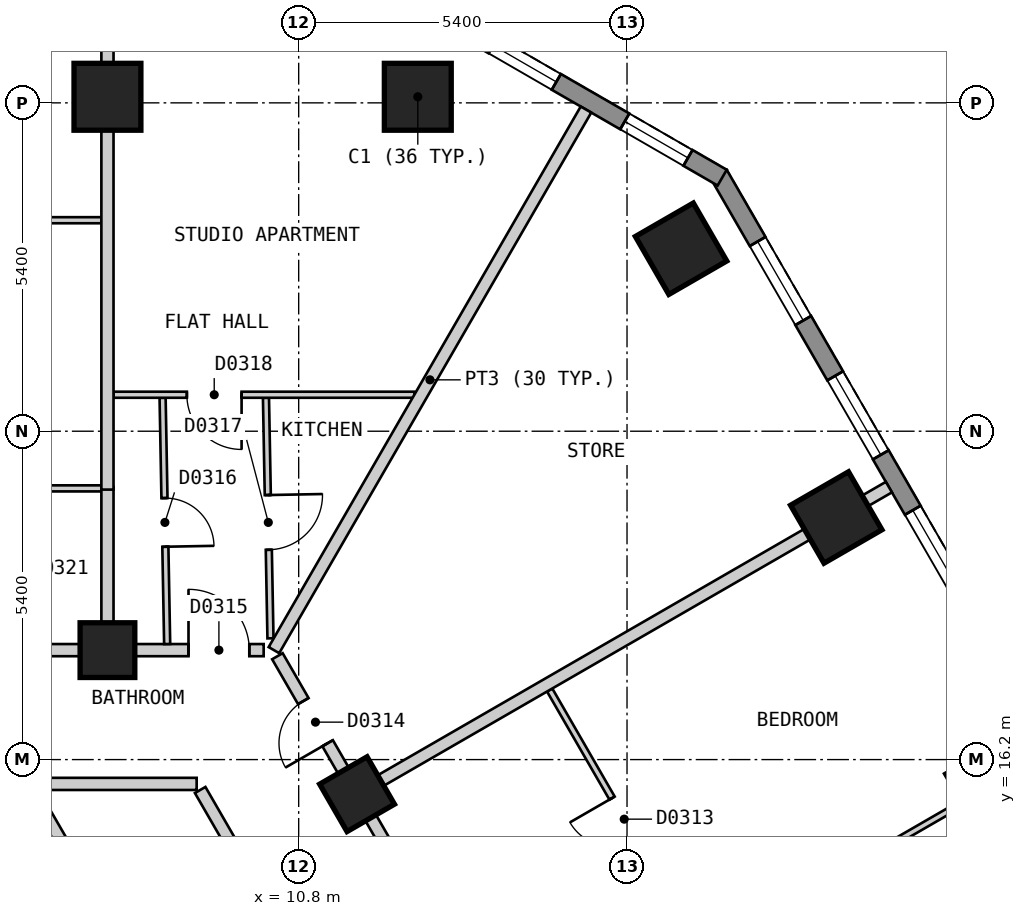
"""IFC4 building model, lengths in metres.
Left out: names, types, materials, properties, quantities, classifications, styles, units other than length and angle.
Written with IfcOpenShell. Run it as: python <this file> out.ifc"""

import sys

from ifc_helpers import new_model, si_unit, direction, frame, frame_2d, origin, origin_2d, place, context, subcontext, project, spatial, polyline, rectangle, outline, extrude, element, fill, save


model = new_model("IFC4")
c1 = context("Model", 3, precision=1e-05, world=origin(), true_north=direction((0.0, 1.0)))
c2 = subcontext(c1, "Body", "Model", "MODEL_VIEW")
j1 = project(units=[si_unit("LENGTHUNIT", "METRE"), si_unit("PLANEANGLEUNIT", "RADIAN")], contexts=[c1])
p1 = place(None, origin())
s1 = spatial("IfcSite", under=j1, at=p1, CompositionType="ELEMENT")
p2 = place(p1, origin())
s2 = spatial("IfcBuilding", under=s1, at=p2, CompositionType="ELEMENT")
p3 = place(p2, frame((0.0, 0.0, 59.4)))
s3 = spatial("IfcBuildingStorey", under=s2, at=p3, CompositionType="ELEMENT", Elevation=59.4)
for number, where, z_axis, x_axis in (
    (1, (12.759, 27.1, 0.0), (0.0, 0.0, 1.0), (-1.0, 0.0, 0.0)),
    (2, (7.655, 27.1, 0.0), (0.0, 0.0, 1.0), (-1.0, 0.0, 0.0)),
    (3, (22.193, 15.761, 0.0), (0.0, 0.0, 1.0), (-0.5, 0.866, 0.0)),
    (4, (19.641, 20.181, 0.0), (0.0, 0.0, 1.0), (-0.5, 0.866, 0.0)),
    (5, (17.089, 24.601, 0.0), (0.0, 0.0, 1.0), (-0.5, 0.866, 0.0)),
):
    element("IfcColumn", number, at=place(p3, frame(where, z_axis=z_axis, x_axis=x_axis)), inside=s3, PredefinedType="COLUMN", context=c2, shape_type="SweptSolid", body=[
        extrude(rectangle(XDim=1.1, YDim=1.1, at=origin_2d()), origin(), (0.0, 0.0, 1.0), 3.0),
    ])
for number, where, z_axis, x_axis in (
    (6, (11.76, 15.631, 0.0), (0.0, 0.0, 1.0), (-0.5, 0.866, 0.0)),
    (7, (7.655, 18.0, 0.0), (0.0, 0.0, 1.0), (-1.0, 0.0, 0.0)),
):
    element("IfcColumn", number, at=place(p3, frame(where, z_axis=z_axis, x_axis=x_axis)), inside=s3, PredefinedType="COLUMN", context=c2, shape_type="SweptSolid", body=[
        extrude(rectangle(XDim=0.9, YDim=0.9, at=origin_2d()), origin(), (0.0, 0.0, 1.0), 3.0),
    ])
p4 = place(p3, frame((31.22, 2.425, 0.0), z_axis=(0.0, 0.0, 1.0), x_axis=(-0.500001938803, 0.866024284413, 0.0)))
e8 = element("IfcWall", 8, at=p4, inside=s3, PredefinedType="SOLIDWALL", context=c2, shape_type="SweptSolid", body=[
    extrude(outline(polyline([(0.0, -0.15), (27.02, -0.15), (26.94, 0.15), (0.08, 0.15), (0.0, -0.15)])), origin(), (0.0, 0.0, 1.0), 2.6),
])
p5 = place(p4, frame((1.277, 0.0, 0.15)))
e9 = element("IfcOpeningElement", 9, at=p5, cuts=e8, PredefinedType="OPENING", context=c2, shape_type="SweptSolid", body=[
    extrude(rectangle(XDim=1.5, YDim=2.1, at=frame_2d((0.75, 1.05))), frame((0.0, 0.16, 0.0), z_axis=(0.0, -1.0, 0.0), x_axis=(1.0, 0.0, 0.0)), (0.0, 0.0, 1.0), 0.32),
])
p6 = place(p4, frame((3.829, 0.0, 0.15)))
e10 = element("IfcOpeningElement", 10, at=p6, cuts=e8, PredefinedType="OPENING", context=c2, shape_type="SweptSolid", body=[
    extrude(rectangle(XDim=1.5, YDim=2.1, at=frame_2d((0.75, 1.05))), frame((0.0, 0.16, 0.0), z_axis=(0.0, -1.0, 0.0), x_axis=(1.0, 0.0, 0.0)), (0.0, 0.0, 1.0), 0.32),
])
p7 = place(p4, frame((6.382, 0.0, 0.15)))
e11 = element("IfcOpeningElement", 11, at=p7, cuts=e8, PredefinedType="OPENING", context=c2, shape_type="SweptSolid", body=[
    extrude(rectangle(XDim=1.5, YDim=2.1, at=frame_2d((0.75, 1.05))), frame((0.0, 0.16, 0.0), z_axis=(0.0, -1.0, 0.0), x_axis=(1.0, 0.0, 0.0)), (0.0, 0.0, 1.0), 0.32),
])
p8 = place(p4, frame((8.933, 0.0, 0.15)))
e12 = element("IfcOpeningElement", 12, at=p8, cuts=e8, PredefinedType="OPENING", context=c2, shape_type="SweptSolid", body=[
    extrude(rectangle(XDim=1.5, YDim=2.1, at=frame_2d((0.75, 1.05))), frame((0.0, 0.16, 0.0), z_axis=(0.0, -1.0, 0.0), x_axis=(1.0, 0.0, 0.0)), (0.0, 0.0, 1.0), 0.32),
])
p9 = place(p4, frame((11.485, 0.0, 0.15)))
e13 = element("IfcOpeningElement", 13, at=p9, cuts=e8, PredefinedType="OPENING", context=c2, shape_type="SweptSolid", body=[
    extrude(rectangle(XDim=1.5, YDim=2.1, at=frame_2d((0.75, 1.05))), frame((0.0, 0.16, 0.0), z_axis=(0.0, -1.0, 0.0), x_axis=(1.0, 0.0, 0.0)), (0.0, 0.0, 1.0), 0.32),
])
p10 = place(p4, frame((14.037, 0.0, 0.15)))
e14 = element("IfcOpeningElement", 14, at=p10, cuts=e8, PredefinedType="OPENING", context=c2, shape_type="SweptSolid", body=[
    extrude(rectangle(XDim=1.5, YDim=2.1, at=frame_2d((0.75, 1.05))), frame((0.0, 0.16, 0.0), z_axis=(0.0, -1.0, 0.0), x_axis=(1.0, 0.0, 0.0)), (0.0, 0.0, 1.0), 0.32),
])
p11 = place(p4, frame((16.589, 0.0, 0.15)))
e15 = element("IfcOpeningElement", 15, at=p11, cuts=e8, PredefinedType="OPENING", context=c2, shape_type="SweptSolid", body=[
    extrude(rectangle(XDim=1.5, YDim=2.1, at=frame_2d((0.75, 1.05))), frame((0.0, 0.16, 0.0), z_axis=(0.0, -1.0, 0.0), x_axis=(1.0, 0.0, 0.0)), (0.0, 0.0, 1.0), 0.32),
])
p12 = place(p4, frame((19.141, 0.0, 0.15)))
e16 = element("IfcOpeningElement", 16, at=p12, cuts=e8, PredefinedType="OPENING", context=c2, shape_type="SweptSolid", body=[
    extrude(rectangle(XDim=1.5, YDim=2.1, at=frame_2d((0.75, 1.05))), frame((0.0, 0.16, 0.0), z_axis=(0.0, -1.0, 0.0), x_axis=(1.0, 0.0, 0.0)), (0.0, 0.0, 1.0), 0.32),
])
p13 = place(p4, frame((21.693, 0.0, 0.15)))
e17 = element("IfcOpeningElement", 17, at=p13, cuts=e8, PredefinedType="OPENING", context=c2, shape_type="SweptSolid", body=[
    extrude(rectangle(XDim=1.5, YDim=2.1, at=frame_2d((0.75, 1.05))), frame((0.0, 0.16, 0.0), z_axis=(0.0, -1.0, 0.0), x_axis=(1.0, 0.0, 0.0)), (0.0, 0.0, 1.0), 0.32),
])
p14 = place(p4, frame((24.244, 0.0, 0.15)))
e18 = element("IfcOpeningElement", 18, at=p14, cuts=e8, PredefinedType="OPENING", context=c2, shape_type="SweptSolid", body=[
    extrude(rectangle(XDim=1.5, YDim=2.1, at=frame_2d((0.75, 1.05))), frame((0.0, 0.16, 0.0), z_axis=(0.0, -1.0, 0.0), x_axis=(1.0, 0.0, 0.0)), (0.0, 0.0, 1.0), 0.32),
])
p15 = place(p3, frame((17.765, 25.77, 0.0), z_axis=(0.0, 0.0, 1.0), x_axis=(-0.866010750942, 0.50002537861, 0.0)))
e19 = element("IfcWall", 19, at=p15, inside=s3, PredefinedType="SOLIDWALL", context=c2, shape_type="SweptSolid", body=[
    extrude(outline(polyline([(0.0, -0.15), (5.0, -0.15), (4.919, 0.15), (0.08, 0.15), (0.0, -0.15)])), origin(), (0.0, 0.0, 1.0), 2.6),
])
p16 = place(p15, frame((0.65, 0.0, 0.15)))
e20 = element("IfcOpeningElement", 20, at=p16, cuts=e19, PredefinedType="OPENING", context=c2, shape_type="SweptSolid", body=[
    extrude(rectangle(XDim=1.2, YDim=2.1, at=frame_2d((0.6, 1.05))), frame((0.0, 0.16, 0.0), z_axis=(0.0, -1.0, 0.0), x_axis=(1.0, 0.0, 0.0)), (0.0, 0.0, 1.0), 0.32),
])
p17 = place(p15, frame((3.15, 0.0, 0.15)))
e21 = element("IfcOpeningElement", 21, at=p17, cuts=e19, PredefinedType="OPENING", context=c2, shape_type="SweptSolid", body=[
    extrude(rectangle(XDim=1.2, YDim=2.1, at=frame_2d((0.6, 1.05))), frame((0.0, 0.16, 0.0), z_axis=(0.0, -1.0, 0.0), x_axis=(1.0, 0.0, 0.0)), (0.0, 0.0, 1.0), 0.32),
])
p18 = place(p3, frame((6.409, 15.7, 0.0), z_axis=(0.0, 0.0, 1.0), x_axis=(0.499930377127, -0.866065596838, 0.0)))
e22 = element("IfcWall", 22, at=p18, inside=s3, PredefinedType="PARTITIONING", context=c2, shape_type="SweptSolid", body=[
    extrude(rectangle(XDim=8.775, YDim=0.2, at=frame_2d((4.388, 0.0))), origin(), (0.0, 0.0, 1.0), 2.6),
])
p19 = place(p3, frame((9.18, 15.7, 0.0), z_axis=(0.0, 0.0, 1.0), x_axis=(0.500003652032, -0.866023295272, 0.0)))
e23 = element("IfcWall", 23, at=p19, inside=s3, PredefinedType="PARTITIONING", context=c2, shape_type="SweptSolid", body=[
    extrude(rectangle(XDim=18.012, YDim=0.2, at=frame_2d((9.006, 0.0))), origin(), (0.0, 0.0, 1.0), 2.6),
])
p20 = place(p19, frame((8.556, 0.0, 0.0)))
e24 = element("IfcOpeningElement", 24, at=p20, cuts=e23, PredefinedType="OPENING", context=c2, shape_type="SweptSolid", body=[
    extrude(rectangle(XDim=0.9, YDim=2.1, at=frame_2d((0.45, 1.05))), frame((0.0, 0.11, 0.0), z_axis=(0.0, -1.0, 0.0), x_axis=(1.0, 0.0, 0.0)), (0.0, 0.0, 1.0), 0.22),
])
p21 = place(p3, frame((10.45, 17.9, 0.0), z_axis=(0.0, 0.0, 1.0), x_axis=(0.500034352617, -0.866005569383, 0.0)))
e25 = element("IfcWall", 25, at=p21, inside=s3, PredefinedType="PARTITIONING", context=c2, shape_type="SweptSolid", body=[
    extrude(rectangle(XDim=20.553, YDim=0.2, at=frame_2d((10.276, 0.0))), origin(), (0.0, 0.0, 1.0), 2.6),
])
p22 = place(p21, frame((14.903, 0.0, 0.0)))
e26 = element("IfcOpeningElement", 26, at=p22, cuts=e25, PredefinedType="OPENING", context=c2, shape_type="SweptSolid", body=[
    extrude(rectangle(XDim=1.0, YDim=2.1, at=frame_2d((0.5, 1.05))), frame((0.0, 0.11, 0.0), z_axis=(0.0, -1.0, 0.0), x_axis=(1.0, 0.0, 0.0)), (0.0, 0.0, 1.0), 0.22),
])
p23 = place(p21, frame((9.775, 0.0, 0.0)))
e27 = element("IfcOpeningElement", 27, at=p23, cuts=e25, PredefinedType="OPENING", context=c2, shape_type="SweptSolid", body=[
    extrude(rectangle(XDim=1.0, YDim=2.1, at=frame_2d((0.5, 1.05))), frame((0.0, 0.11, 0.0), z_axis=(0.0, -1.0, 0.0), x_axis=(1.0, 0.0, 0.0)), (0.0, 0.0, 1.0), 0.22),
])
p24 = place(p21, frame((0.852, 0.0, 0.0)))
e28 = element("IfcOpeningElement", 28, at=p24, cuts=e25, PredefinedType="OPENING", context=c2, shape_type="SweptSolid", body=[
    extrude(rectangle(XDim=0.8, YDim=2.1, at=frame_2d((0.4, 1.05))), frame((0.0, 0.11, 0.0), z_axis=(0.0, -1.0, 0.0), x_axis=(1.0, 0.0, 0.0)), (0.0, 0.0, 1.0), 0.22),
])
p25 = place(p3, frame((6.351, 15.8, 0.0), z_axis=(0.0, 0.0, 1.0), x_axis=(1.0, 0.0, 0.0)))
e29 = element("IfcWall", 29, at=p25, inside=s3, PredefinedType="PARTITIONING", context=c2, shape_type="SweptSolid", body=[
    extrude(rectangle(XDim=2.771, YDim=0.2, at=frame_2d((1.385, 0.0))), origin(), (0.0, 0.0, 1.0), 2.6),
])
p26 = place(p3, frame((-10.276, 18.0, 0.0), z_axis=(0.0, 0.0, 1.0), x_axis=(1.0, 0.0, 0.0)))
e30 = element("IfcWall", 30, at=p26, inside=s3, PredefinedType="PARTITIONING", context=c2, shape_type="SweptSolid", body=[
    extrude(rectangle(XDim=20.5, YDim=0.2, at=frame_2d((10.25, 0.0))), origin(), (0.0, 0.0, 1.0), 2.6),
])
p27 = place(p26, frame((19.264, 0.0, 0.0)))
e31 = element("IfcOpeningElement", 31, at=p27, cuts=e30, PredefinedType="OPENING", context=c2, shape_type="SweptSolid", body=[
    extrude(rectangle(XDim=1.0, YDim=2.1, at=frame_2d((0.5, 1.05))), frame((0.0, 0.11, 0.0), z_axis=(0.0, -1.0, 0.0), x_axis=(1.0, 0.0, 0.0)), (0.0, 0.0, 1.0), 0.22),
])
p28 = place(p26, frame((14.879, 0.0, 0.0)))
e32 = element("IfcOpeningElement", 32, at=p28, cuts=e30, PredefinedType="OPENING", context=c2, shape_type="SweptSolid", body=[
    extrude(rectangle(XDim=1.0, YDim=2.1, at=frame_2d((0.5, 1.05))), frame((0.0, 0.11, 0.0), z_axis=(0.0, -1.0, 0.0), x_axis=(1.0, 0.0, 0.0)), (0.0, 0.0, 1.0), 0.22),
])
p29 = place(p26, frame((4.671, 0.0, 0.0)))
e33 = element("IfcOpeningElement", 33, at=p29, cuts=e30, PredefinedType="OPENING", context=c2, shape_type="SweptSolid", body=[
    extrude(rectangle(XDim=1.0, YDim=2.1, at=frame_2d((0.5, 1.05))), frame((0.0, 0.11, 0.0), z_axis=(0.0, -1.0, 0.0), x_axis=(1.0, 0.0, 0.0)), (0.0, 0.0, 1.0), 0.22),
])
p30 = place(p3, frame((14.928, 17.344, 0.0), z_axis=(0.0, 0.0, 1.0), x_axis=(0.499881743012, -0.866093668724, 0.0)))
e34 = element("IfcWall", 34, at=p30, inside=s3, PredefinedType="PARTITIONING", context=c2, shape_type="SweptSolid", body=[
    extrude(rectangle(XDim=4.953, YDim=0.1, at=frame_2d((2.477, 0.0))), origin(), (0.0, 0.0, 1.0), 2.6),
])
p31 = place(p30, frame((2.052, 0.0, 0.0)))
e35 = element("IfcOpeningElement", 35, at=p31, cuts=e34, PredefinedType="OPENING", context=c2, shape_type="SweptSolid", body=[
    extrude(rectangle(XDim=0.8, YDim=2.1, at=frame_2d((0.4, 1.05))), frame((0.0, 0.06, 0.0), z_axis=(0.0, -1.0, 0.0), x_axis=(1.0, 0.0, 0.0)), (0.0, 0.0, 1.0), 0.12),
])
p32 = place(p3, frame((8.562, 22.15, 0.0), z_axis=(0.0, 0.0, 1.0), x_axis=(0.018504185939, -0.999828782894, 0.0)))
e36 = element("IfcWall", 36, at=p32, inside=s3, PredefinedType="PARTITIONING", context=c2, shape_type="SweptSolid", body=[
    extrude(rectangle(XDim=4.051, YDim=0.1, at=frame_2d((2.025, 0.0))), origin(), (0.0, 0.0, 1.0), 2.6),
])
p33 = place(p32, frame((1.65, 0.0, 0.0)))
e37 = element("IfcOpeningElement", 37, at=p33, cuts=e36, PredefinedType="OPENING", context=c2, shape_type="SweptSolid", body=[
    extrude(rectangle(XDim=0.8, YDim=2.1, at=frame_2d((0.4, 1.05))), frame((0.0, 0.06, 0.0), z_axis=(0.0, -1.0, 0.0), x_axis=(1.0, 0.0, 0.0)), (0.0, 0.0, 1.0), 0.12),
])
p34 = place(p3, frame((10.262, 22.15, 0.0), z_axis=(0.0, 0.0, 1.0), x_axis=(0.018696971826, -0.999825196344, 0.0)))
e38 = element("IfcWall", 38, at=p34, inside=s3, PredefinedType="PARTITIONING", context=c2, shape_type="SweptSolid", body=[
    extrude(rectangle(XDim=3.957, YDim=0.1, at=frame_2d((1.978, 0.0))), origin(), (0.0, 0.0, 1.0), 2.6),
])
p35 = place(p34, frame((1.6, 0.0, 0.0)))
e39 = element("IfcOpeningElement", 39, at=p35, cuts=e38, PredefinedType="OPENING", context=c2, shape_type="SweptSolid", body=[
    extrude(rectangle(XDim=0.9, YDim=2.1, at=frame_2d((0.45, 1.05))), frame((0.0, 0.06, 0.0), z_axis=(0.0, -1.0, 0.0), x_axis=(1.0, 0.0, 0.0)), (0.0, 0.0, 1.0), 0.12),
])
p36 = place(p3, frame((4.388, 20.66, 0.0), z_axis=(0.0, 0.0, 1.0), x_axis=(1.0, 0.0, 0.0)))
e40 = element("IfcWall", 40, at=p36, inside=s3, PredefinedType="PARTITIONING", context=c2, shape_type="SweptSolid", body=[
    extrude(rectangle(XDim=3.167, YDim=0.1, at=frame_2d((1.583, 0.0))), origin(), (0.0, 0.0, 1.0), 2.6),
])
p37 = place(p3, frame((7.755, 22.2, 0.0), z_axis=(0.0, 0.0, 1.0), x_axis=(1.0, 0.0, 0.0)))
e41 = element("IfcWall", 41, at=p37, inside=s3, PredefinedType="PARTITIONING", context=c2, shape_type="SweptSolid", body=[
    extrude(rectangle(XDim=4.947, YDim=0.1, at=frame_2d((2.474, 0.0))), origin(), (0.0, 0.0, 1.0), 2.6),
])
p38 = place(p37, frame((1.206, 0.0, 0.0)))
e42 = element("IfcOpeningElement", 42, at=p38, cuts=e41, PredefinedType="OPENING", context=c2, shape_type="SweptSolid", body=[
    extrude(rectangle(XDim=0.9, YDim=2.1, at=frame_2d((0.45, 1.05))), frame((0.0, 0.06, 0.0), z_axis=(0.0, -1.0, 0.0), x_axis=(1.0, 0.0, 0.0)), (0.0, 0.0, 1.0), 0.12),
])
p39 = place(p3, frame((2.601, 25.07, 0.0), z_axis=(0.0, 0.0, 1.0), x_axis=(1.0, 0.0, 0.0)))
e43 = element("IfcWall", 43, at=p39, inside=s3, PredefinedType="PARTITIONING", context=c2, shape_type="SweptSolid", body=[
    extrude(rectangle(XDim=4.954, YDim=0.1, at=frame_2d((2.477, 0.0))), origin(), (0.0, 0.0, 1.0), 2.6),
])
p40 = place(p39, frame((2.052, 0.0, 0.0)))
e44 = element("IfcOpeningElement", 44, at=p40, cuts=e43, PredefinedType="OPENING", context=c2, shape_type="SweptSolid", body=[
    extrude(rectangle(XDim=0.9, YDim=2.1, at=frame_2d((0.45, 1.05))), frame((0.0, 0.06, 0.0), z_axis=(0.0, -1.0, 0.0), x_axis=(1.0, 0.0, 0.0)), (0.0, 0.0, 1.0), 0.12),
])
p41 = place(p3, frame((14.399, 11.261, 0.0), z_axis=(0.0, 0.0, 1.0), x_axis=(0.866022959057, 0.500004234368, 0.0)))
e45 = element("IfcWall", 45, at=p41, inside=s3, PredefinedType="PARTITIONING", context=c2, shape_type="SweptSolid", body=[
    extrude(rectangle(XDim=10.0, YDim=0.1, at=frame_2d((5.0, 0.0))), origin(), (0.0, 0.0, 1.0), 2.6),
])
p42 = place(p41, frame((4.775, 0.0, 0.0)))
e46 = element("IfcOpeningElement", 46, at=p42, cuts=e45, PredefinedType="OPENING", context=c2, shape_type="SweptSolid", body=[
    extrude(rectangle(XDim=0.9, YDim=2.1, at=frame_2d((0.45, 1.05))), frame((0.0, 0.06, 0.0), z_axis=(0.0, -1.0, 0.0), x_axis=(1.0, 0.0, 0.0)), (0.0, 0.0, 1.0), 0.12),
])
p43 = place(p3, frame((7.655, 20.68, 0.0), z_axis=(0.0, 0.0, 1.0), x_axis=(0.0, -1.0, 0.0)))
e47 = element("IfcWall", 47, at=p43, inside=s3, PredefinedType="PARTITIONING", context=c2, shape_type="SweptSolid", body=[
    extrude(rectangle(XDim=2.58, YDim=0.2, at=frame_2d((1.29, 0.0))), origin(), (0.0, 0.0, 1.0), 2.6),
])
p44 = place(p3, frame((10.393, 18.0, 0.0), z_axis=(0.0, 0.0, 1.0), x_axis=(0.499945497007, 0.866056868816, 0.0)))
e48 = element("IfcWall", 48, at=p44, inside=s3, PredefinedType="PARTITIONING", context=c2, shape_type="SweptSolid", body=[
    extrude(rectangle(XDim=10.265, YDim=0.2, at=frame_2d((5.132, 0.0))), origin(), (0.0, 0.0, 1.0), 2.6),
])
p45 = place(p3, frame((7.655, 20.64, 0.0), z_axis=(0.0, 0.0, 1.0), x_axis=(0.0, 1.0, 0.0)))
e49 = element("IfcWall", 49, at=p45, inside=s3, PredefinedType="PARTITIONING", context=c2, shape_type="SweptSolid", body=[
    extrude(rectangle(XDim=7.46, YDim=0.2, at=frame_2d((3.73, 0.0))), origin(), (0.0, 0.0, 1.0), 2.6),
])
p46 = place(p3, frame((11.847, 15.681, 0.0), z_axis=(0.0, 0.0, 1.0), x_axis=(0.866022959057, 0.500004234368, 0.0)))
e50 = element("IfcWall", 50, at=p46, inside=s3, PredefinedType="PARTITIONING", context=c2, shape_type="SweptSolid", body=[
    extrude(rectangle(XDim=10.0, YDim=0.2, at=frame_2d((5.0, 0.0))), origin(), (0.0, 0.0, 1.0), 2.6),
])
p47 = place(p12, origin())
e51 = element("IfcWindow", 51, at=p47, inside=s3, PartitioningType="SINGLE_PANEL", PredefinedType="WINDOW", context=c2, shape_type="SweptSolid", body=[
    extrude(rectangle(XDim=1.5, YDim=2.1, at=frame_2d((0.75, 1.05))), frame((0.0, 0.03, 0.0), z_axis=(0.0, -1.0, 0.0), x_axis=(1.0, 0.0, 0.0)), (0.0, 0.0, 1.0), 0.06),
])
fill(e16, e51)
p48 = place(p13, origin())
e52 = element("IfcWindow", 52, at=p48, inside=s3, PartitioningType="SINGLE_PANEL", PredefinedType="WINDOW", context=c2, shape_type="SweptSolid", body=[
    extrude(rectangle(XDim=1.5, YDim=2.1, at=frame_2d((0.75, 1.05))), frame((0.0, 0.03, 0.0), z_axis=(0.0, -1.0, 0.0), x_axis=(1.0, 0.0, 0.0)), (0.0, 0.0, 1.0), 0.06),
])
fill(e17, e52)
p49 = place(p14, origin())
e53 = element("IfcWindow", 53, at=p49, inside=s3, PartitioningType="SINGLE_PANEL", PredefinedType="WINDOW", context=c2, shape_type="SweptSolid", body=[
    extrude(rectangle(XDim=1.5, YDim=2.1, at=frame_2d((0.75, 1.05))), frame((0.0, 0.03, 0.0), z_axis=(0.0, -1.0, 0.0), x_axis=(1.0, 0.0, 0.0)), (0.0, 0.0, 1.0), 0.06),
])
fill(e18, e53)
p50 = place(p16, origin())
e54 = element("IfcWindow", 54, at=p50, inside=s3, PartitioningType="SINGLE_PANEL", PredefinedType="WINDOW", context=c2, shape_type="SweptSolid", body=[
    extrude(rectangle(XDim=1.2, YDim=2.1, at=frame_2d((0.6, 1.05))), frame((0.0, 0.03, 0.0), z_axis=(0.0, -1.0, 0.0), x_axis=(1.0, 0.0, 0.0)), (0.0, 0.0, 1.0), 0.06),
])
fill(e20, e54)
p51 = place(p17, origin())
e55 = element("IfcWindow", 55, at=p51, inside=s3, PartitioningType="SINGLE_PANEL", PredefinedType="WINDOW", context=c2, shape_type="SweptSolid", body=[
    extrude(rectangle(XDim=1.2, YDim=2.1, at=frame_2d((0.6, 1.05))), frame((0.0, 0.03, 0.0), z_axis=(0.0, -1.0, 0.0), x_axis=(1.0, 0.0, 0.0)), (0.0, 0.0, 1.0), 0.06),
])
fill(e21, e55)
p52 = place(p31, origin())
e56 = element("IfcDoor", 56, at=p52, inside=s3, OperationType="SINGLE_SWING_LEFT", PredefinedType="DOOR", context=c2, shape_type="SweptSolid", body=[
    extrude(rectangle(XDim=0.8, YDim=2.1, at=frame_2d((0.4, 1.05))), frame((0.0, 0.025, 0.0), z_axis=(0.0, -1.0, 0.0), x_axis=(1.0, 0.0, 0.0)), (0.0, 0.0, 1.0), 0.05),
])
fill(e35, e56)
p53 = place(p24, origin())
e57 = element("IfcDoor", 57, at=p53, inside=s3, OperationType="SINGLE_SWING_RIGHT", PredefinedType="DOOR", context=c2, shape_type="SweptSolid", body=[
    extrude(rectangle(XDim=0.8, YDim=2.1, at=frame_2d((0.4, 1.05))), frame((0.0, 0.025, 0.0), z_axis=(0.0, -1.0, 0.0), x_axis=(1.0, 0.0, 0.0)), (0.0, 0.0, 1.0), 0.05),
])
fill(e28, e57)
p54 = place(p27, origin())
e58 = element("IfcDoor", 58, at=p54, inside=s3, OperationType="SINGLE_SWING_LEFT", PredefinedType="DOOR", context=c2, shape_type="SweptSolid", body=[
    extrude(rectangle(XDim=1.0, YDim=2.1, at=frame_2d((0.5, 1.05))), frame((0.0, 0.025, 0.0), z_axis=(0.0, -1.0, 0.0), x_axis=(1.0, 0.0, 0.0)), (0.0, 0.0, 1.0), 0.05),
])
fill(e31, e58)
p55 = place(p33, origin())
e59 = element("IfcDoor", 59, at=p55, inside=s3, OperationType="SINGLE_SWING_RIGHT", PredefinedType="DOOR", context=c2, shape_type="SweptSolid", body=[
    extrude(rectangle(XDim=0.8, YDim=2.1, at=frame_2d((0.4, 1.05))), frame((0.0, 0.025, 0.0), z_axis=(0.0, -1.0, 0.0), x_axis=(1.0, 0.0, 0.0)), (0.0, 0.0, 1.0), 0.05),
])
fill(e37, e59)
p56 = place(p35, origin())
e60 = element("IfcDoor", 60, at=p56, inside=s3, OperationType="SINGLE_SWING_LEFT", PredefinedType="DOOR", context=c2, shape_type="SweptSolid", body=[
    extrude(rectangle(XDim=0.9, YDim=2.1, at=frame_2d((0.45, 1.05))), frame((0.0, 0.025, 0.0), z_axis=(0.0, -1.0, 0.0), x_axis=(1.0, 0.0, 0.0)), (0.0, 0.0, 1.0), 0.05),
])
fill(e39, e60)
p57 = place(p38, origin())
e61 = element("IfcDoor", 61, at=p57, inside=s3, OperationType="SINGLE_SWING_RIGHT", PredefinedType="DOOR", context=c2, shape_type="SweptSolid", body=[
    extrude(rectangle(XDim=0.9, YDim=2.1, at=frame_2d((0.45, 1.05))), frame((0.0, 0.025, 0.0), z_axis=(0.0, -1.0, 0.0), x_axis=(1.0, 0.0, 0.0)), (0.0, 0.0, 1.0), 0.05),
])
fill(e42, e61)
save(model, sys.argv[1])
